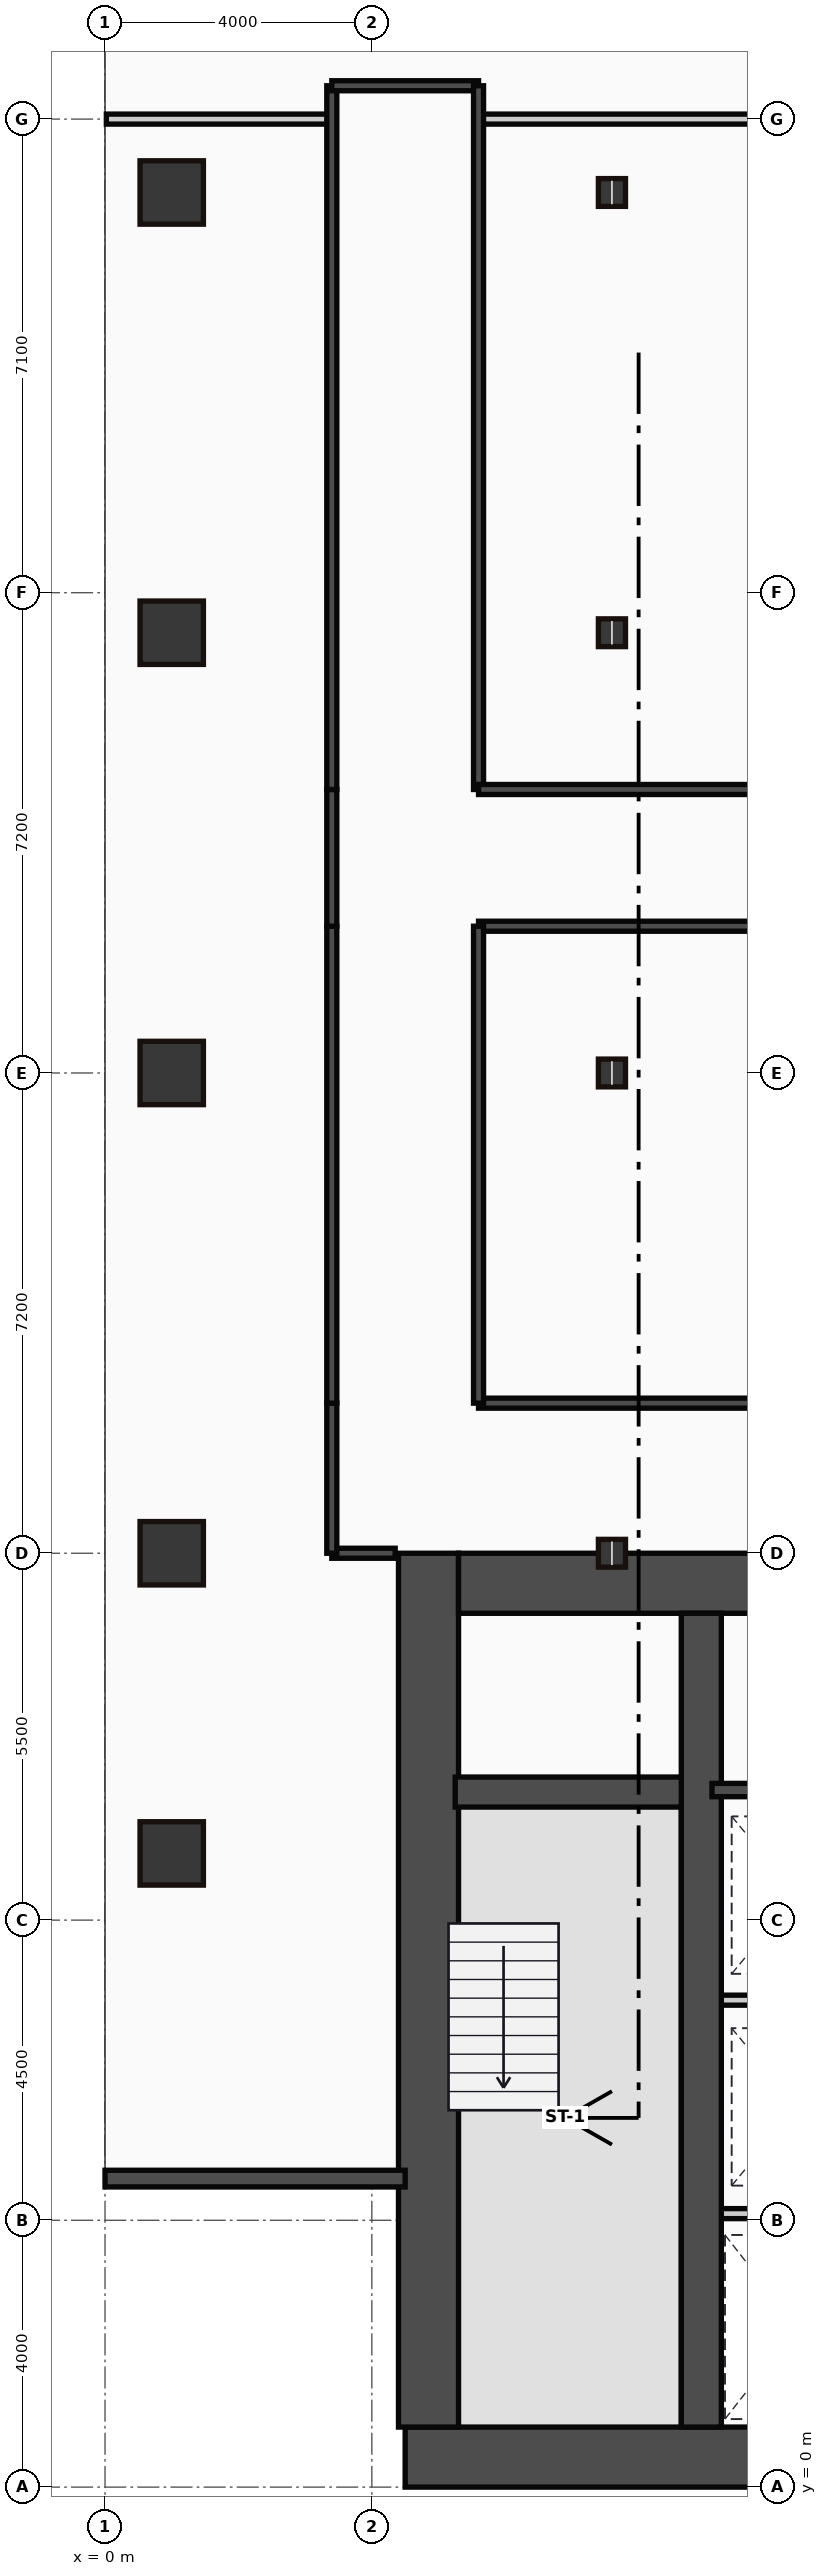
"""IFC4 building model, lengths in metres.
Left out: names, types, materials, properties, quantities, classifications, styles, units other than length and angle.
Written with IfcOpenShell. Run it as: python <this file> out.ifc"""

import sys

from ifc_helpers import new_model, si_unit, direction, frame, frame_2d, origin, origin_2d, place, context, subcontext, project, spatial, rectangle, hollow_rectangle, i_section, extrude, source, transform, mapped, element, fill, save


model = new_model("IFC4")
c1 = context("Model", 3, precision=1e-05, world=origin(), true_north=direction((0.0, 1.0)))
c2 = subcontext(c1, "Body", "Model", "MODEL_VIEW")
j1 = project(units=[si_unit("LENGTHUNIT", "METRE"), si_unit("PLANEANGLEUNIT", "RADIAN")], contexts=[c1])
p1 = place(None, origin())
s1 = spatial("IfcSite", under=j1, at=p1, CompositionType="ELEMENT")
p2 = place(p1, origin())
s2 = spatial("IfcBuilding", under=s1, at=p2, CompositionType="ELEMENT")
p3 = place(p2, frame((0.0, 0.0, 32.5)))
s3 = spatial("IfcBuildingStorey", under=s2, at=p3, CompositionType="ELEMENT", Elevation=32.5)
m1 = source(origin(), c2, "Body", "SweptSolid", [
    extrude(rectangle(XDim=29.5, YDim=0.9, at=frame_2d((14.75, 0.0))), origin(), (0.0, 0.0, 1.0), 3.65),
])
p4 = place(p3, frame((4.5, 0.45, 0.0), z_axis=(0.0, 0.0, 1.0), x_axis=(1.0, 0.0, 0.0)))
e1 = element("IfcWall", 1, at=p4, inside=s3, PredefinedType="SHEAR", context=c2, shape_type="MappedRepresentation", body=[
    mapped(m1, transform((0.0, 0.0, 0.0))),
])
m2 = source(origin(), c2, "Body", "SweptSolid", [
    extrude(rectangle(XDim=13.1, YDim=0.9, at=frame_2d((6.55, 0.0))), origin(), (0.0, 0.0, 1.0), 3.65),
])
p5 = place(p3, frame((4.85, 0.9, 0.0), z_axis=(0.0, 0.0, 1.0), x_axis=(0.0, 1.0, 0.0)))
e2 = element("IfcWall", 2, at=p5, inside=s3, PredefinedType="SHEAR", context=c2, shape_type="MappedRepresentation", body=[
    mapped(m2, transform((0.0, 0.0, 0.0))),
])
m3 = source(origin(), c2, "Body", "SweptSolid", [
    extrude(rectangle(XDim=9.1, YDim=0.9, at=frame_2d((4.55, 0.0))), origin(), (0.0, 0.0, 1.0), 3.65),
])
p6 = place(p3, frame((5.3, 13.55, 0.0), z_axis=(0.0, 0.0, 1.0), x_axis=(1.0, 0.0, 0.0)))
e3 = element("IfcWall", 3, at=p6, inside=s3, PredefinedType="SHEAR", context=c2, shape_type="MappedRepresentation", body=[
    mapped(m3, transform((0.0, 0.0, 0.0))),
])
p7 = place(p6, frame((4.1, 0.0, 0.0)))
e4 = element("IfcOpeningElement", 4, at=p7, cuts=e3, PredefinedType="OPENING", context=c2, shape_type="SweptSolid", body=[
    extrude(rectangle(XDim=1.1, YDim=2.15, at=frame_2d((0.55, 1.075))), frame((0.0, 0.46, 0.0), z_axis=(0.0, -1.0, 0.0), x_axis=(1.0, 0.0, 0.0)), (0.0, 0.0, 1.0), 0.92),
])
m4 = source(origin(), c2, "Body", "SweptSolid", [
    extrude(rectangle(XDim=12.2, YDim=0.6, at=frame_2d((6.1, 0.0))), origin(), (0.0, 0.0, 1.0), 3.65),
])
p8 = place(p3, frame((8.94, 0.9, 0.0), z_axis=(0.0, 0.0, 1.0), x_axis=(0.0, 1.0, 0.0)))
e5 = element("IfcWall", 5, at=p8, inside=s3, PredefinedType="SHEAR", context=c2, shape_type="MappedRepresentation", body=[
    mapped(m4, transform((0.0, 0.0, 0.0))),
])
m5 = source(origin(), c2, "Body", "SweptSolid", [
    extrude(rectangle(XDim=3.39, YDim=0.45, at=frame_2d((1.695, 0.0))), origin(), (0.0, 0.0, 1.0), 3.65),
])
p9 = place(p3, frame((5.25, 10.42, 0.0), z_axis=(0.0, 0.0, 1.0), x_axis=(1.0, 0.0, 0.0)))
e6 = element("IfcWall", 6, at=p9, inside=s3, PredefinedType="SHEAR", context=c2, shape_type="MappedRepresentation", body=[
    mapped(m5, transform((0.0, 0.0, 0.0))),
])
p10 = place(p9, frame((1.05, 0.0, 0.0)))
e7 = element("IfcOpeningElement", 7, at=p10, cuts=e6, PredefinedType="OPENING", context=c2, shape_type="SweptSolid", body=[
    extrude(rectangle(XDim=1.1, YDim=2.15, at=frame_2d((0.55, 1.075))), frame((0.0, 0.235, 0.0), z_axis=(0.0, -1.0, 0.0), x_axis=(1.0, 0.0, 0.0)), (0.0, 0.0, 1.0), 0.47),
])
m6 = source(origin(), c2, "Body", "SweptSolid", [
    extrude(hollow_rectangle(XDim=0.95, YDim=0.95, WallThickness=0.045, at=origin_2d()), origin(), (0.0, 0.0, 1.0), 3.65),
])
for number, where, z_axis, x_axis in (
    (8, (1.0, 9.5, 0.0), (0.0, 0.0, 1.0), (1.0, 0.0, 0.0)),
    (9, (1.0, 14.0, 0.0), (0.0, 0.0, 1.0), (1.0, 0.0, 0.0)),
    (10, (1.0, 21.2, 0.0), (0.0, 0.0, 1.0), (1.0, 0.0, 0.0)),
    (11, (1.0, 27.8, 0.0), (0.0, 0.0, 1.0), (1.0, 0.0, 0.0)),
    (12, (1.0, 34.4, 0.0), (0.0, 0.0, 1.0), (1.0, 0.0, 0.0)),
):
    element("IfcColumn", number, at=place(p3, frame(where, z_axis=z_axis, x_axis=x_axis)), inside=s3, PredefinedType="COLUMN", context=c2, shape_type="MappedRepresentation", body=[
        mapped(m6, transform((0.0, 0.0, 0.0))),
    ])
m7 = source(origin(), c2, "Body", "SweptSolid", [
    extrude(i_section(OverallWidth=0.406, OverallDepth=0.416, WebThickness=0.03, FlangeThickness=0.048, at=origin_2d()), origin(), (0.0, 0.0, 1.0), 3.65),
])
for number, where, z_axis, x_axis in (
    (13, (7.6, 14.0, 0.0), (0.0, 0.0, 1.0), (1.0, 0.0, 0.0)),
    (14, (7.6, 21.2, 0.0), (0.0, 0.0, 1.0), (1.0, 0.0, 0.0)),
    (15, (7.6, 27.8, 0.0), (0.0, 0.0, 1.0), (1.0, 0.0, 0.0)),
    (16, (7.6, 34.4, 0.0), (0.0, 0.0, 1.0), (1.0, 0.0, 0.0)),
):
    element("IfcColumn", number, at=place(p3, frame(where, z_axis=z_axis, x_axis=x_axis)), inside=s3, PredefinedType="COLUMN", context=c2, shape_type="MappedRepresentation", body=[
        mapped(m7, transform((0.0, 0.0, 0.0))),
    ])
m8 = source(origin(), c2, "Body", "SweptSolid", [
    extrude(rectangle(XDim=4.5, YDim=0.25, at=frame_2d((2.25, 0.0))), origin(), (0.0, 0.0, 1.0), 3.4),
])
p11 = place(p3, frame((0.0, 4.625, 0.0), z_axis=(0.0, 0.0, 1.0), x_axis=(1.0, 0.0, 0.0)))
e17 = element("IfcWall", 17, at=p11, inside=s3, PredefinedType="STANDARD", context=c2, shape_type="MappedRepresentation", body=[
    mapped(m8, transform((0.0, 0.0, 0.0))),
])
m9 = source(origin(), c2, "Body", "SweptSolid", [
    extrude(rectangle(XDim=2.35, YDim=0.2, at=frame_2d((1.175, 0.0))), origin(), (0.0, 0.0, 1.0), 3.4),
])
p12 = place(p3, frame((9.1, 10.45, 0.0), z_axis=(0.0, 0.0, 1.0), x_axis=(1.0, 0.0, 0.0)))
e18 = element("IfcWall", 18, at=p12, inside=s3, PredefinedType="PARTITIONING", context=c2, shape_type="MappedRepresentation", body=[
    mapped(m9, transform((0.0, 0.0, 0.0))),
])
p13 = place(p12, frame((0.55, 0.0, 0.0)))
e19 = element("IfcOpeningElement", 19, at=p13, cuts=e18, PredefinedType="OPENING", context=c2, shape_type="SweptSolid", body=[
    extrude(rectangle(XDim=1.1, YDim=2.15, at=frame_2d((0.55, 1.075))), frame((0.0, 0.11, 0.0), z_axis=(0.0, -1.0, 0.0), x_axis=(1.0, 0.0, 0.0)), (0.0, 0.0, 1.0), 0.22),
])
m10 = source(origin(), c2, "Body", "SweptSolid", [
    extrude(rectangle(XDim=2.4, YDim=0.15, at=frame_2d((1.2, 0.0))), origin(), (0.0, 0.0, 1.0), 3.4),
])
for number, where, z_axis, x_axis in (
    (20, (9.1, 4.1, 0.0), (0.0, 0.0, 1.0), (1.0, 0.0, 0.0)),
    (21, (9.1, 7.3, 0.0), (0.0, 0.0, 1.0), (1.0, 0.0, 0.0)),
):
    element("IfcWall", number, at=place(p3, frame(where, z_axis=z_axis, x_axis=x_axis)), inside=s3, PredefinedType="PARTITIONING", context=c2, shape_type="MappedRepresentation", body=[
        mapped(m10, transform((0.0, 0.0, 0.0))),
    ])
m11 = source(origin(), c2, "Body", "SweptSolid", [
    extrude(rectangle(XDim=0.95, YDim=0.15, at=frame_2d((0.475, 0.0))), origin(), (0.0, 0.0, 1.0), 2.625),
])
p14 = place(p3, frame((4.35, 14.0, 0.0), z_axis=(0.0, 0.0, 1.0), x_axis=(-1.0, 0.0, 0.0)))
e22 = element("IfcWall", 22, at=p14, inside=s3, PredefinedType="PARTITIONING", context=c2, shape_type="MappedRepresentation", body=[
    mapped(m11, transform((0.0, 0.0, 0.0))),
])
m12 = source(origin(), c2, "Body", "SweptSolid", [
    extrude(rectangle(XDim=2.25, YDim=0.15, at=frame_2d((1.125, 0.0))), origin(), (0.0, 0.0, 1.0), 3.4),
])
p15 = place(p3, frame((3.4, 14.0, 0.0), z_axis=(0.0, 0.0, 1.0), x_axis=(0.0, 1.0, 0.0)))
e23 = element("IfcWall", 23, at=p15, inside=s3, PredefinedType="PARTITIONING", context=c2, shape_type="MappedRepresentation", body=[
    mapped(m12, transform((0.0, 0.0, 0.0))),
])
m13 = source(origin(), c2, "Body", "SweptSolid", [
    extrude(rectangle(XDim=7.15, YDim=0.15, at=frame_2d((3.575, 0.0))), origin(), (0.0, 0.0, 1.0), 3.4),
])
p16 = place(p3, frame((3.4, 16.25, 0.0), z_axis=(0.0, 0.0, 1.0), x_axis=(0.0, 1.0, 0.0)))
e24 = element("IfcWall", 24, at=p16, inside=s3, PredefinedType="PARTITIONING", context=c2, shape_type="MappedRepresentation", body=[
    mapped(m13, transform((0.0, 0.0, 0.0))),
])
m14 = source(origin(), c2, "Body", "SweptSolid", [
    extrude(rectangle(XDim=2.05, YDim=0.15, at=frame_2d((1.025, 0.0))), origin(), (0.0, 0.0, 1.0), 3.4),
])
p17 = place(p3, frame((3.4, 23.4, 0.0), z_axis=(0.0, 0.0, 1.0), x_axis=(0.0, 1.0, 0.0)))
e25 = element("IfcWall", 25, at=p17, inside=s3, PredefinedType="PARTITIONING", context=c2, shape_type="MappedRepresentation", body=[
    mapped(m14, transform((0.0, 0.0, 0.0))),
])
m15 = source(origin(), c2, "Body", "SweptSolid", [
    extrude(rectangle(XDim=10.55, YDim=0.15, at=frame_2d((5.275, 0.0))), origin(), (0.0, 0.0, 1.0), 3.4),
])
p18 = place(p3, frame((3.4, 25.45, 0.0), z_axis=(0.0, 0.0, 1.0), x_axis=(0.0, 1.0, 0.0)))
e26 = element("IfcWall", 26, at=p18, inside=s3, PredefinedType="PARTITIONING", context=c2, shape_type="MappedRepresentation", body=[
    mapped(m15, transform((0.0, 0.0, 0.0))),
])
p19 = place(p18, frame((4.68, 0.0, 0.0)))
e27 = element("IfcOpeningElement", 27, at=p19, cuts=e26, PredefinedType="OPENING", context=c2, shape_type="SweptSolid", body=[
    extrude(rectangle(XDim=0.95, YDim=2.15, at=frame_2d((0.475, 1.075))), frame((0.0, 0.085, 0.0), z_axis=(0.0, -1.0, 0.0), x_axis=(1.0, 0.0, 0.0)), (0.0, 0.0, 1.0), 0.17),
])
m16 = source(origin(), c2, "Body", "SweptSolid", [
    extrude(rectangle(XDim=2.2, YDim=0.15, at=frame_2d((1.1, 0.0))), origin(), (0.0, 0.0, 1.0), 3.4),
])
p20 = place(p3, frame((3.4, 36.0, 0.0), z_axis=(0.0, 0.0, 1.0), x_axis=(1.0, 0.0, 0.0)))
e28 = element("IfcWall", 28, at=p20, inside=s3, PredefinedType="PARTITIONING", context=c2, shape_type="MappedRepresentation", body=[
    mapped(m16, transform((0.0, 0.0, 0.0))),
])
p21 = place(p20, frame((0.625, 0.0, 0.0)))
e29 = element("IfcOpeningElement", 29, at=p21, cuts=e28, PredefinedType="OPENING", context=c2, shape_type="SweptSolid", body=[
    extrude(rectangle(XDim=0.95, YDim=2.15, at=frame_2d((0.475, 1.075))), frame((0.0, 0.085, 0.0), z_axis=(0.0, -1.0, 0.0), x_axis=(1.0, 0.0, 0.0)), (0.0, 0.0, 1.0), 0.17),
])
p22 = place(p3, frame((5.6, 36.0, 0.0), z_axis=(0.0, 0.0, 1.0), x_axis=(0.0, -1.0, 0.0)))
e30 = element("IfcWall", 30, at=p22, inside=s3, PredefinedType="PARTITIONING", context=c2, shape_type="MappedRepresentation", body=[
    mapped(m15, transform((0.0, 0.0, 0.0))),
])
p23 = place(p22, frame((4.92, 0.0, 0.0)))
e31 = element("IfcOpeningElement", 31, at=p23, cuts=e30, PredefinedType="OPENING", context=c2, shape_type="SweptSolid", body=[
    extrude(rectangle(XDim=0.95, YDim=2.15, at=frame_2d((0.475, 1.075))), frame((0.0, 0.085, 0.0), z_axis=(0.0, -1.0, 0.0), x_axis=(1.0, 0.0, 0.0)), (0.0, 0.0, 1.0), 0.17),
])
m17 = source(origin(), c2, "Body", "SweptSolid", [
    extrude(rectangle(XDim=38.8, YDim=0.15, at=frame_2d((19.4, 0.0))), origin(), (0.0, 0.0, 1.0), 3.4),
])
p24 = place(p3, frame((5.6, 25.45, 0.0), z_axis=(0.0, 0.0, 1.0), x_axis=(1.0, 0.0, 0.0)))
e32 = element("IfcWall", 32, at=p24, inside=s3, PredefinedType="PARTITIONING", context=c2, shape_type="MappedRepresentation", body=[
    mapped(m17, transform((0.0, 0.0, 0.0))),
])
p25 = place(p24, frame((14.125, 0.0, 0.0)))
e33 = element("IfcOpeningElement", 33, at=p25, cuts=e32, PredefinedType="OPENING", context=c2, shape_type="SweptSolid", body=[
    extrude(rectangle(XDim=0.95, YDim=2.15, at=frame_2d((0.475, 1.075))), frame((0.0, 0.085, 0.0), z_axis=(0.0, -1.0, 0.0), x_axis=(1.0, 0.0, 0.0)), (0.0, 0.0, 1.0), 0.17),
])
p26 = place(p24, frame((24.925, 0.0, 0.0)))
e34 = element("IfcOpeningElement", 34, at=p26, cuts=e32, PredefinedType="OPENING", context=c2, shape_type="SweptSolid", body=[
    extrude(rectangle(XDim=0.95, YDim=2.15, at=frame_2d((0.475, 1.075))), frame((0.0, 0.085, 0.0), z_axis=(0.0, -1.0, 0.0), x_axis=(1.0, 0.0, 0.0)), (0.0, 0.0, 1.0), 0.17),
])
p27 = place(p3, frame((5.6, 16.25, 0.0), z_axis=(0.0, 0.0, 1.0), x_axis=(1.0, 0.0, 0.0)))
e35 = element("IfcWall", 35, at=p27, inside=s3, PredefinedType="PARTITIONING", context=c2, shape_type="MappedRepresentation", body=[
    mapped(m17, transform((0.0, 0.0, 0.0))),
])
p28 = place(p27, frame((4.255, 0.0, 0.0)))
e36 = element("IfcOpeningElement", 36, at=p28, cuts=e35, PredefinedType="OPENING", context=c2, shape_type="SweptSolid", body=[
    extrude(rectangle(XDim=0.95, YDim=2.15, at=frame_2d((0.475, 1.075))), frame((0.0, 0.085, 0.0), z_axis=(0.0, -1.0, 0.0), x_axis=(1.0, 0.0, 0.0)), (0.0, 0.0, 1.0), 0.17),
])
p29 = place(p27, frame((14.125, 0.0, 0.0)))
e37 = element("IfcOpeningElement", 37, at=p29, cuts=e35, PredefinedType="OPENING", context=c2, shape_type="SweptSolid", body=[
    extrude(rectangle(XDim=0.95, YDim=2.15, at=frame_2d((0.475, 1.075))), frame((0.0, 0.085, 0.0), z_axis=(0.0, -1.0, 0.0), x_axis=(1.0, 0.0, 0.0)), (0.0, 0.0, 1.0), 0.17),
])
m18 = source(origin(), c2, "Body", "SweptSolid", [
    extrude(rectangle(XDim=38.8, YDim=0.15, at=frame_2d((19.4, 0.0))), origin(), (0.0, 0.0, 1.0), 2.978),
])
p30 = place(p3, frame((44.4, 23.4, 0.0), z_axis=(0.0, 0.0, 1.0), x_axis=(-1.0, 0.0, 0.0)))
e38 = element("IfcWall", 38, at=p30, inside=s3, PredefinedType="PARTITIONING", context=c2, shape_type="MappedRepresentation", body=[
    mapped(m18, transform((0.0, 0.0, 0.0))),
])
p31 = place(p30, frame((12.925, 0.0, 0.0)))
e39 = element("IfcOpeningElement", 39, at=p31, cuts=e38, PredefinedType="OPENING", context=c2, shape_type="SweptSolid", body=[
    extrude(rectangle(XDim=0.95, YDim=2.15, at=frame_2d((0.475, 1.075))), frame((0.0, 0.085, 0.0), z_axis=(0.0, -1.0, 0.0), x_axis=(1.0, 0.0, 0.0)), (0.0, 0.0, 1.0), 0.17),
])
p32 = place(p30, frame((3.655, 0.0, 0.0)))
e40 = element("IfcOpeningElement", 40, at=p32, cuts=e38, PredefinedType="OPENING", context=c2, shape_type="SweptSolid", body=[
    extrude(rectangle(XDim=0.95, YDim=2.15, at=frame_2d((0.475, 1.075))), frame((0.0, 0.085, 0.0), z_axis=(0.0, -1.0, 0.0), x_axis=(1.0, 0.0, 0.0)), (0.0, 0.0, 1.0), 0.17),
])
p33 = place(p3, frame((5.6, 23.4, 0.0), z_axis=(0.0, 0.0, 1.0), x_axis=(0.0, -1.0, 0.0)))
e41 = element("IfcWall", 41, at=p33, inside=s3, PredefinedType="PARTITIONING", context=c2, shape_type="MappedRepresentation", body=[
    mapped(m13, transform((0.0, 0.0, 0.0))),
])
m19 = source(origin(), c2, "Body", "SweptSolid", [
    extrude(rectangle(XDim=3.38, YDim=0.15, at=frame_2d((1.69, 0.0))), origin(), (0.0, 0.0, 1.0), 3.4),
])
p34 = place(p3, frame((0.02, 35.5, 0.0), z_axis=(0.0, 0.0, 1.0), x_axis=(1.0, 0.0, 0.0)))
e42 = element("IfcWall", 42, at=p34, inside=s3, PredefinedType="PARTITIONING", context=c2, shape_type="MappedRepresentation", body=[
    mapped(m19, transform((0.0, 0.0, 0.0))),
])
m20 = source(origin(), c2, "Body", "SweptSolid", [
    extrude(rectangle(XDim=9.2, YDim=0.15, at=frame_2d((4.6, 0.0))), origin(), (0.0, 0.0, 1.0), 3.4),
])
p35 = place(p3, frame((14.8, 35.5, 0.0), z_axis=(0.0, 0.0, 1.0), x_axis=(-1.0, 0.0, 0.0)))
e43 = element("IfcWall", 43, at=p35, inside=s3, PredefinedType="PARTITIONING", context=c2, shape_type="MappedRepresentation", body=[
    mapped(m20, transform((0.0, 0.0, 0.0))),
])
m21 = source(origin(), c2, "Body", "SweptSolid", [
    extrude(rectangle(XDim=1.1, YDim=2.15, at=frame_2d((0.55, 1.075))), frame((0.0, 0.025, 0.0), z_axis=(0.0, -1.0, 0.0), x_axis=(1.0, 0.0, 0.0)), (0.0, 0.0, 1.0), 0.05),
])
p36 = place(p10, frame((1.1, 0.0, 0.0), z_axis=(0.0, 0.0, 1.0), x_axis=(-1.0, 0.0, 0.0)))
e44 = element("IfcDoor", 44, at=p36, inside=s3, OperationType="SINGLE_SWING_LEFT", PredefinedType="DOOR", context=c2, shape_type="MappedRepresentation", body=[
    mapped(m21, transform((0.0, 0.0, 0.0))),
])
fill(e7, e44)
p37 = place(p7, origin())
e45 = element("IfcDoor", 45, at=p37, inside=s3, OperationType="SINGLE_SWING_RIGHT", PredefinedType="DOOR", context=c2, shape_type="MappedRepresentation", body=[
    mapped(m21, transform((0.0, 0.0, 0.0))),
])
fill(e4, e45)
m22 = source(origin(), c2, "Body", "SweptSolid", [
    extrude(rectangle(XDim=0.95, YDim=2.15, at=frame_2d((0.475, 1.075))), frame((0.0, 0.025, 0.0), z_axis=(0.0, -1.0, 0.0), x_axis=(1.0, 0.0, 0.0)), (0.0, 0.0, 1.0), 0.05),
])
p38 = place(p19, origin())
e46 = element("IfcDoor", 46, at=p38, inside=s3, OperationType="SINGLE_SWING_RIGHT", PredefinedType="DOOR", context=c2, shape_type="MappedRepresentation", body=[
    mapped(m22, transform((0.0, 0.0, 0.0))),
])
fill(e27, e46)
p39 = place(p21, origin())
e47 = element("IfcDoor", 47, at=p39, inside=s3, OperationType="SINGLE_SWING_LEFT", PredefinedType="DOOR", context=c2, shape_type="MappedRepresentation", body=[
    mapped(m22, transform((0.0, 0.0, 0.0))),
])
fill(e29, e47)
p40 = place(p23, origin())
e48 = element("IfcDoor", 48, at=p40, inside=s3, OperationType="SINGLE_SWING_LEFT", PredefinedType="DOOR", context=c2, shape_type="MappedRepresentation", body=[
    mapped(m22, transform((0.0, 0.0, 0.0))),
])
fill(e31, e48)
save(model, sys.argv[1])
